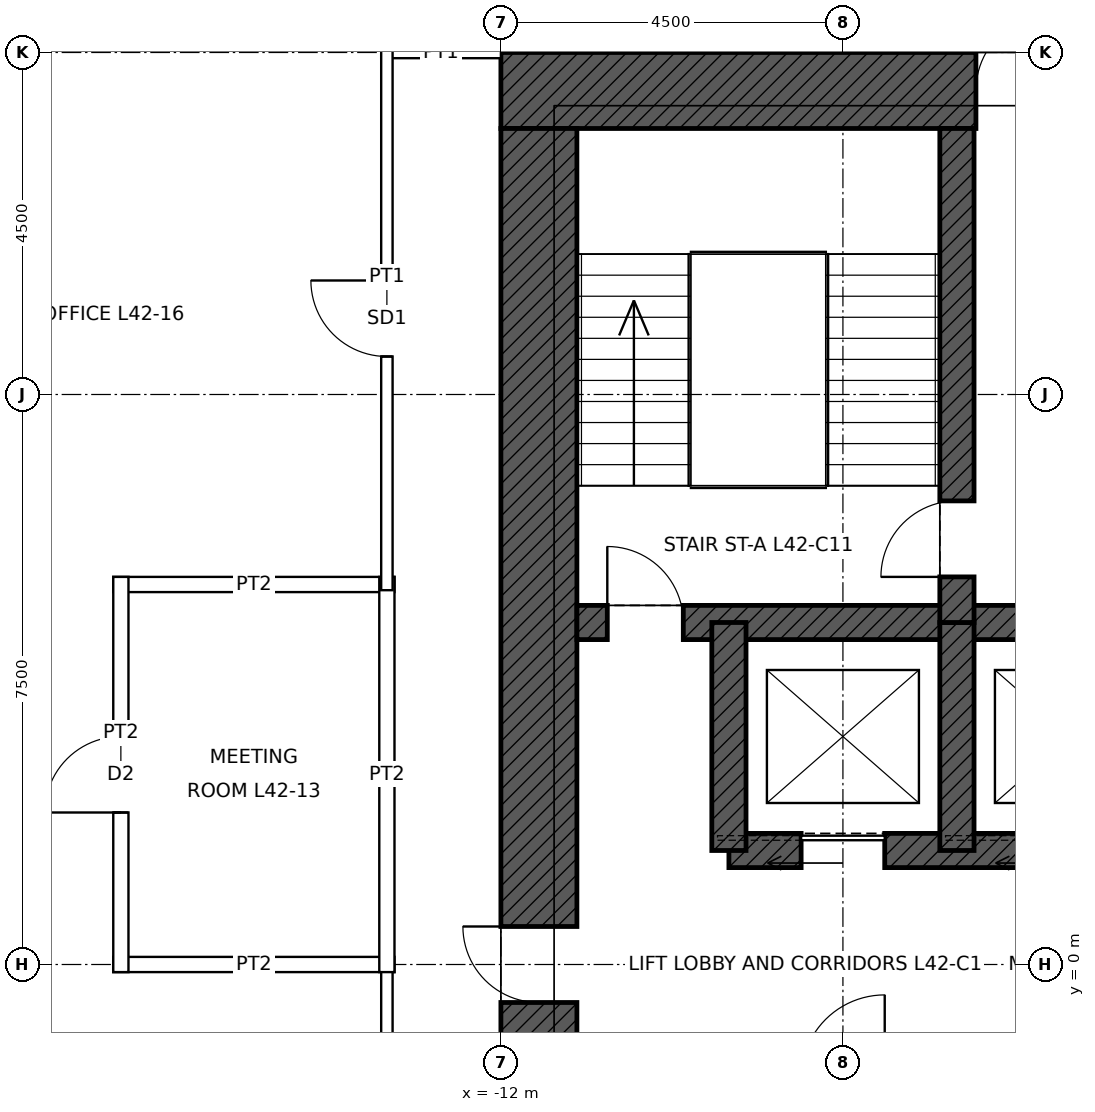
"""IFC4 building model, lengths in metres.
Left out: names, types, materials, properties, quantities, classifications, styles, units other than length and angle.
Written with IfcOpenShell. Run it as: python <this file> out.ifc"""

import sys

from ifc_helpers import new_model, si_unit, direction, frame, frame_2d, origin, place, context, subcontext, project, spatial, rectangle, extrude, element, fill, save


model = new_model("IFC4")
c1 = context("Model", 3, precision=1e-05, world=origin(), true_north=direction((0.0, 1.0)))
c2 = subcontext(c1, "Body", "Model", "MODEL_VIEW")
j1 = project(units=[si_unit("LENGTHUNIT", "METRE"), si_unit("PLANEANGLEUNIT", "RADIAN")], contexts=[c1])
p1 = place(None, origin())
s1 = spatial("IfcSite", under=j1, at=p1, CompositionType="ELEMENT")
p2 = place(p1, origin())
s2 = spatial("IfcBuilding", under=s1, at=p2, CompositionType="ELEMENT")
p3 = place(p2, frame((0.0, 0.0, 201.9)))
s3 = spatial("IfcBuildingStorey", under=s2, at=p3, CompositionType="ELEMENT", Elevation=201.9)
p4 = place(p3, frame((-12.0, 11.5, 0.0), z_axis=(0.0, 0.0, 1.0), x_axis=(1.0, 0.0, 0.0)))
e1 = element("IfcWall", 1, at=p4, inside=s3, PredefinedType="SHEAR", context=c2, shape_type="SweptSolid", body=[
    extrude(rectangle(XDim=24.0, YDim=1.0, at=frame_2d((12.0, 0.0))), origin(), (0.0, 0.0, 1.0), 4.0),
])
p5 = place(p4, frame((6.25, 0.0, 0.0)))
e2 = element("IfcOpeningElement", 2, at=p5, cuts=e1, PredefinedType="OPENING", context=c2, shape_type="SweptSolid", body=[
    extrude(rectangle(XDim=1.0, YDim=2.4, at=frame_2d((0.5, 1.2))), frame((0.0, 0.51, 0.0), z_axis=(0.0, -1.0, 0.0), x_axis=(1.0, 0.0, 0.0)), (0.0, 0.0, 1.0), 1.02),
])
p6 = place(p4, frame((16.75, 0.0, 0.0)))
e3 = element("IfcOpeningElement", 3, at=p6, cuts=e1, PredefinedType="OPENING", context=c2, shape_type="SweptSolid", body=[
    extrude(rectangle(XDim=1.0, YDim=2.4, at=frame_2d((0.5, 1.2))), frame((0.0, 0.51, 0.0), z_axis=(0.0, -1.0, 0.0), x_axis=(1.0, 0.0, 0.0)), (0.0, 0.0, 1.0), 1.02),
])
p7 = place(p3, frame((-11.5, -11.0, 0.0), z_axis=(0.0, 0.0, 1.0), x_axis=(0.0, 1.0, 0.0)))
e4 = element("IfcWall", 4, at=p7, inside=s3, PredefinedType="SHEAR", context=c2, shape_type="SweptSolid", body=[
    extrude(rectangle(XDim=22.0, YDim=1.0, at=frame_2d((11.0, 0.0))), origin(), (0.0, 0.0, 1.0), 4.0),
])
p8 = place(p7, frame((10.5, 0.0, 0.0)))
e5 = element("IfcOpeningElement", 5, at=p8, cuts=e4, PredefinedType="OPENING", context=c2, shape_type="SweptSolid", body=[
    extrude(rectangle(XDim=1.0, YDim=2.4, at=frame_2d((0.5, 1.2))), frame((0.0, 0.51, 0.0), z_axis=(0.0, -1.0, 0.0), x_axis=(1.0, 0.0, 0.0)), (0.0, 0.0, 1.0), 1.02),
])
p9 = place(p3, frame((-11.0, 4.5, 0.0), z_axis=(0.0, 0.0, 1.0), x_axis=(1.0, 0.0, 0.0)))
e6 = element("IfcWall", 6, at=p9, inside=s3, PredefinedType="SHEAR", context=c2, shape_type="SweptSolid", body=[
    extrude(rectangle(XDim=22.0, YDim=0.45, at=frame_2d((11.0, 0.0))), origin(), (0.0, 0.0, 1.0), 4.0),
])
p10 = place(p9, frame((0.4, 0.0, 0.0)))
e7 = element("IfcOpeningElement", 7, at=p10, cuts=e6, PredefinedType="OPENING", context=c2, shape_type="SweptSolid", body=[
    extrude(rectangle(XDim=1.0, YDim=2.1, at=frame_2d((0.5, 1.05))), frame((0.0, 0.235, 0.0), z_axis=(0.0, -1.0, 0.0), x_axis=(1.0, 0.0, 0.0)), (0.0, 0.0, 1.0), 0.47),
])
p11 = place(p9, frame((20.6, 0.0, 0.0)))
e8 = element("IfcOpeningElement", 8, at=p11, cuts=e6, PredefinedType="OPENING", context=c2, shape_type="SweptSolid", body=[
    extrude(rectangle(XDim=1.0, YDim=2.1, at=frame_2d((0.5, 1.05))), frame((0.0, 0.235, 0.0), z_axis=(0.0, -1.0, 0.0), x_axis=(1.0, 0.0, 0.0)), (0.0, 0.0, 1.0), 0.47),
])
p12 = place(p3, frame((-9.0, 1.5, 0.0), z_axis=(0.0, 0.0, 1.0), x_axis=(1.0, 0.0, 0.0)))
e9 = element("IfcWall", 9, at=p12, inside=s3, PredefinedType="SHEAR", context=c2, shape_type="SweptSolid", body=[
    extrude(rectangle(XDim=18.0, YDim=0.45, at=frame_2d((9.0, 0.0))), origin(), (0.0, 0.0, 1.0), 4.0),
])
p13 = place(p12, frame((0.95, 0.0, 0.0)))
e10 = element("IfcOpeningElement", 10, at=p13, cuts=e9, PredefinedType="OPENING", context=c2, shape_type="SweptSolid", body=[
    extrude(rectangle(XDim=1.1, YDim=2.1, at=frame_2d((0.55, 1.05))), frame((0.0, 0.235, 0.0), z_axis=(0.0, -1.0, 0.0), x_axis=(1.0, 0.0, 0.0)), (0.0, 0.0, 1.0), 0.47),
])
p14 = place(p12, frame((3.95, 0.0, 0.0)))
e11 = element("IfcOpeningElement", 11, at=p14, cuts=e9, PredefinedType="OPENING", context=c2, shape_type="SweptSolid", body=[
    extrude(rectangle(XDim=1.1, YDim=2.1, at=frame_2d((0.55, 1.05))), frame((0.0, 0.235, 0.0), z_axis=(0.0, -1.0, 0.0), x_axis=(1.0, 0.0, 0.0)), (0.0, 0.0, 1.0), 0.47),
])
p15 = place(p12, frame((6.95, 0.0, 0.0)))
e12 = element("IfcOpeningElement", 12, at=p15, cuts=e9, PredefinedType="OPENING", context=c2, shape_type="SweptSolid", body=[
    extrude(rectangle(XDim=1.1, YDim=2.1, at=frame_2d((0.55, 1.05))), frame((0.0, 0.235, 0.0), z_axis=(0.0, -1.0, 0.0), x_axis=(1.0, 0.0, 0.0)), (0.0, 0.0, 1.0), 0.47),
])
p16 = place(p12, frame((9.95, 0.0, 0.0)))
e13 = element("IfcOpeningElement", 13, at=p16, cuts=e9, PredefinedType="OPENING", context=c2, shape_type="SweptSolid", body=[
    extrude(rectangle(XDim=1.1, YDim=2.1, at=frame_2d((0.55, 1.05))), frame((0.0, 0.235, 0.0), z_axis=(0.0, -1.0, 0.0), x_axis=(1.0, 0.0, 0.0)), (0.0, 0.0, 1.0), 0.47),
])
p17 = place(p12, frame((12.95, 0.0, 0.0)))
e14 = element("IfcOpeningElement", 14, at=p17, cuts=e9, PredefinedType="OPENING", context=c2, shape_type="SweptSolid", body=[
    extrude(rectangle(XDim=1.1, YDim=2.1, at=frame_2d((0.55, 1.05))), frame((0.0, 0.235, 0.0), z_axis=(0.0, -1.0, 0.0), x_axis=(1.0, 0.0, 0.0)), (0.0, 0.0, 1.0), 0.47),
])
p18 = place(p12, frame((15.95, 0.0, 0.0)))
e15 = element("IfcOpeningElement", 15, at=p18, cuts=e9, PredefinedType="OPENING", context=c2, shape_type="SweptSolid", body=[
    extrude(rectangle(XDim=1.1, YDim=2.1, at=frame_2d((0.55, 1.05))), frame((0.0, 0.235, 0.0), z_axis=(0.0, -1.0, 0.0), x_axis=(1.0, 0.0, 0.0)), (0.0, 0.0, 1.0), 0.47),
])
for number, where, z_axis, x_axis in (
    (16, (-9.0, 1.5, 0.0), (0.0, 0.0, 1.0), (0.0, 1.0, 0.0)),
    (17, (-6.0, 1.5, 0.0), (0.0, 0.0, 1.0), (0.0, 1.0, 0.0)),
):
    element("IfcWall", number, at=place(p3, frame(where, z_axis=z_axis, x_axis=x_axis)), inside=s3, PredefinedType="SHEAR", context=c2, shape_type="SweptSolid", body=[
        extrude(rectangle(XDim=3.0, YDim=0.45, at=frame_2d((1.5, 0.0))), origin(), (0.0, 0.0, 1.0), 4.0),
    ])
p19 = place(p3, frame((-6.0, 4.5, 0.0), z_axis=(0.0, 0.0, 1.0), x_axis=(0.0, 1.0, 0.0)))
e18 = element("IfcWall", 18, at=p19, inside=s3, PredefinedType="SHEAR", context=c2, shape_type="SweptSolid", body=[
    extrude(rectangle(XDim=6.5, YDim=0.45, at=frame_2d((3.25, 0.0))), origin(), (0.0, 0.0, 1.0), 4.0),
])
p20 = place(p19, frame((0.6, 0.0, 0.0)))
e19 = element("IfcOpeningElement", 19, at=p20, cuts=e18, PredefinedType="OPENING", context=c2, shape_type="SweptSolid", body=[
    extrude(rectangle(XDim=1.0, YDim=2.1, at=frame_2d((0.5, 1.05))), frame((0.0, 0.235, 0.0), z_axis=(0.0, -1.0, 0.0), x_axis=(1.0, 0.0, 0.0)), (0.0, 0.0, 1.0), 0.47),
])
p21 = place(p3, frame((-17.1, 0.0, 0.0), z_axis=(0.0, 0.0, 1.0), x_axis=(1.0, 0.0, 0.0)))
e20 = element("IfcWall", 20, at=p21, inside=s3, PredefinedType="PARTITIONING", context=c2, shape_type="SweptSolid", body=[
    extrude(rectangle(XDim=3.7, YDim=0.2, at=frame_2d((1.85, 0.0))), origin(), (0.0, 0.0, 1.0), 3.238),
])
p22 = place(p3, frame((-17.1, 5.0, 0.0), z_axis=(0.0, 0.0, 1.0), x_axis=(1.0, 0.0, 0.0)))
e21 = element("IfcWall", 21, at=p22, inside=s3, PredefinedType="PARTITIONING", context=c2, shape_type="SweptSolid", body=[
    extrude(rectangle(XDim=3.7, YDim=0.2, at=frame_2d((1.85, 0.0))), origin(), (0.0, 0.0, 1.0), 3.85),
])
p23 = place(p3, frame((-13.575, 12.0, 0.0), z_axis=(0.0, 0.0, 1.0), x_axis=(1.0, 0.0, 0.0)))
e22 = element("IfcWall", 22, at=p23, inside=s3, PredefinedType="PARTITIONING", context=c2, shape_type="SweptSolid", body=[
    extrude(rectangle(XDim=1.575, YDim=0.15, at=frame_2d((0.788, 0.0))), origin(), (0.0, 0.0, 1.0), 3.85),
])
p24 = place(p3, frame((-17.0, -0.1, 0.0), z_axis=(0.0, 0.0, 1.0), x_axis=(0.0, 1.0, 0.0)))
e23 = element("IfcWall", 23, at=p24, inside=s3, PredefinedType="PARTITIONING", context=c2, shape_type="SweptSolid", body=[
    extrude(rectangle(XDim=5.2, YDim=0.2, at=frame_2d((2.6, 0.0))), origin(), (0.0, 0.0, 1.0), 3.85),
])
p25 = place(p24, frame((2.1, 0.0, 0.0)))
e24 = element("IfcOpeningElement", 24, at=p25, cuts=e23, PredefinedType="OPENING", context=c2, shape_type="SweptSolid", body=[
    extrude(rectangle(XDim=1.0, YDim=2.1, at=frame_2d((0.5, 1.05))), frame((0.0, 0.11, 0.0), z_axis=(0.0, -1.0, 0.0), x_axis=(1.0, 0.0, 0.0)), (0.0, 0.0, 1.0), 0.22),
])
p26 = place(p3, frame((-13.5, -13.575, 0.0), z_axis=(0.0, 0.0, 1.0), x_axis=(0.0, 1.0, 0.0)))
e25 = element("IfcWall", 25, at=p26, inside=s3, PredefinedType="PARTITIONING", context=c2, shape_type="SweptSolid", body=[
    extrude(rectangle(XDim=13.65, YDim=0.15, at=frame_2d((6.825, 0.0))), origin(), (0.0, 0.0, 1.0), 3.85),
])
p27 = place(p3, frame((-13.5, -0.1, 0.0), z_axis=(0.0, 0.0, 1.0), x_axis=(0.0, 1.0, 0.0)))
e26 = element("IfcWall", 26, at=p27, inside=s3, PredefinedType="PARTITIONING", context=c2, shape_type="SweptSolid", body=[
    extrude(rectangle(XDim=5.2, YDim=0.2, at=frame_2d((2.6, 0.0))), origin(), (0.0, 0.0, 1.0), 3.85),
])
p28 = place(p3, frame((-13.5, 4.925, 0.0), z_axis=(0.0, 0.0, 1.0), x_axis=(0.0, 1.0, 0.0)))
e27 = element("IfcWall", 27, at=p28, inside=s3, PredefinedType="PARTITIONING", context=c2, shape_type="SweptSolid", body=[
    extrude(rectangle(XDim=7.15, YDim=0.15, at=frame_2d((3.575, 0.0))), origin(), (0.0, 0.0, 1.0), 3.85),
])
p29 = place(p28, frame((3.075, 0.0, 0.0)))
e28 = element("IfcOpeningElement", 28, at=p29, cuts=e27, PredefinedType="OPENING", context=c2, shape_type="SweptSolid", body=[
    extrude(rectangle(XDim=1.0, YDim=2.4, at=frame_2d((0.5, 1.2))), frame((0.0, 0.085, 0.0), z_axis=(0.0, -1.0, 0.0), x_axis=(1.0, 0.0, 0.0)), (0.0, 0.0, 1.0), 0.17),
])
p30 = place(p10, origin())
e29 = element("IfcDoor", 29, at=p30, inside=s3, OperationType="SINGLE_SWING_LEFT", PredefinedType="DOOR", context=c2, shape_type="SweptSolid", body=[
    extrude(rectangle(XDim=1.0, YDim=2.1, at=frame_2d((0.5, 1.05))), frame((0.0, 0.025, 0.0), z_axis=(0.0, -1.0, 0.0), x_axis=(1.0, 0.0, 0.0)), (0.0, 0.0, 1.0), 0.05),
])
fill(e7, e29)
p31 = place(p20, origin())
e30 = element("IfcDoor", 30, at=p31, inside=s3, OperationType="SINGLE_SWING_LEFT", PredefinedType="DOOR", context=c2, shape_type="SweptSolid", body=[
    extrude(rectangle(XDim=1.0, YDim=2.1, at=frame_2d((0.5, 1.05))), frame((0.0, 0.025, 0.0), z_axis=(0.0, -1.0, 0.0), x_axis=(1.0, 0.0, 0.0)), (0.0, 0.0, 1.0), 0.05),
])
fill(e19, e30)
p32 = place(p5, origin())
e31 = element("IfcDoor", 31, at=p32, inside=s3, OperationType="SINGLE_SWING_RIGHT", PredefinedType="DOOR", context=c2, shape_type="SweptSolid", body=[
    extrude(rectangle(XDim=1.0, YDim=2.4, at=frame_2d((0.5, 1.2))), frame((0.0, 0.485, 0.0), z_axis=(0.0, -1.0, 0.0), x_axis=(1.0, 0.0, 0.0)), (0.0, 0.0, 1.0), 0.05),
])
fill(e2, e31)
p33 = place(p8, origin())
e32 = element("IfcDoor", 32, at=p33, inside=s3, OperationType="SINGLE_SWING_RIGHT", PredefinedType="DOOR", context=c2, shape_type="SweptSolid", body=[
    extrude(rectangle(XDim=1.0, YDim=2.4, at=frame_2d((0.5, 1.2))), frame((0.0, 0.485, 0.0), z_axis=(0.0, -1.0, 0.0), x_axis=(1.0, 0.0, 0.0)), (0.0, 0.0, 1.0), 0.05),
])
fill(e5, e32)
p34 = place(p13, origin())
e33 = element("IfcDoor", 33, at=p34, inside=s3, OperationType="SLIDING_TO_LEFT", PredefinedType="DOOR", context=c2, shape_type="SweptSolid", body=[
    extrude(rectangle(XDim=1.1, YDim=2.1, at=frame_2d((0.55, 1.05))), frame((0.0, 0.025, 0.0), z_axis=(0.0, -1.0, 0.0), x_axis=(1.0, 0.0, 0.0)), (0.0, 0.0, 1.0), 0.05),
])
fill(e10, e33)
p35 = place(p25, origin())
e34 = element("IfcDoor", 34, at=p35, inside=s3, OperationType="SINGLE_SWING_LEFT", PredefinedType="DOOR", context=c2, shape_type="SweptSolid", body=[
    extrude(rectangle(XDim=1.0, YDim=2.1, at=frame_2d((0.5, 1.05))), frame((0.0, 0.025, 0.0), z_axis=(0.0, -1.0, 0.0), x_axis=(1.0, 0.0, 0.0)), (0.0, 0.0, 1.0), 0.05),
])
fill(e24, e34)
p36 = place(p29, origin())
e35 = element("IfcDoor", 35, at=p36, inside=s3, OperationType="SINGLE_SWING_RIGHT", PredefinedType="DOOR", context=c2, shape_type="SweptSolid", body=[
    extrude(rectangle(XDim=1.0, YDim=2.4, at=frame_2d((0.5, 1.2))), frame((0.0, 0.025, 0.0), z_axis=(0.0, -1.0, 0.0), x_axis=(1.0, 0.0, 0.0)), (0.0, 0.0, 1.0), 0.05),
])
fill(e28, e35)
save(model, sys.argv[1])
